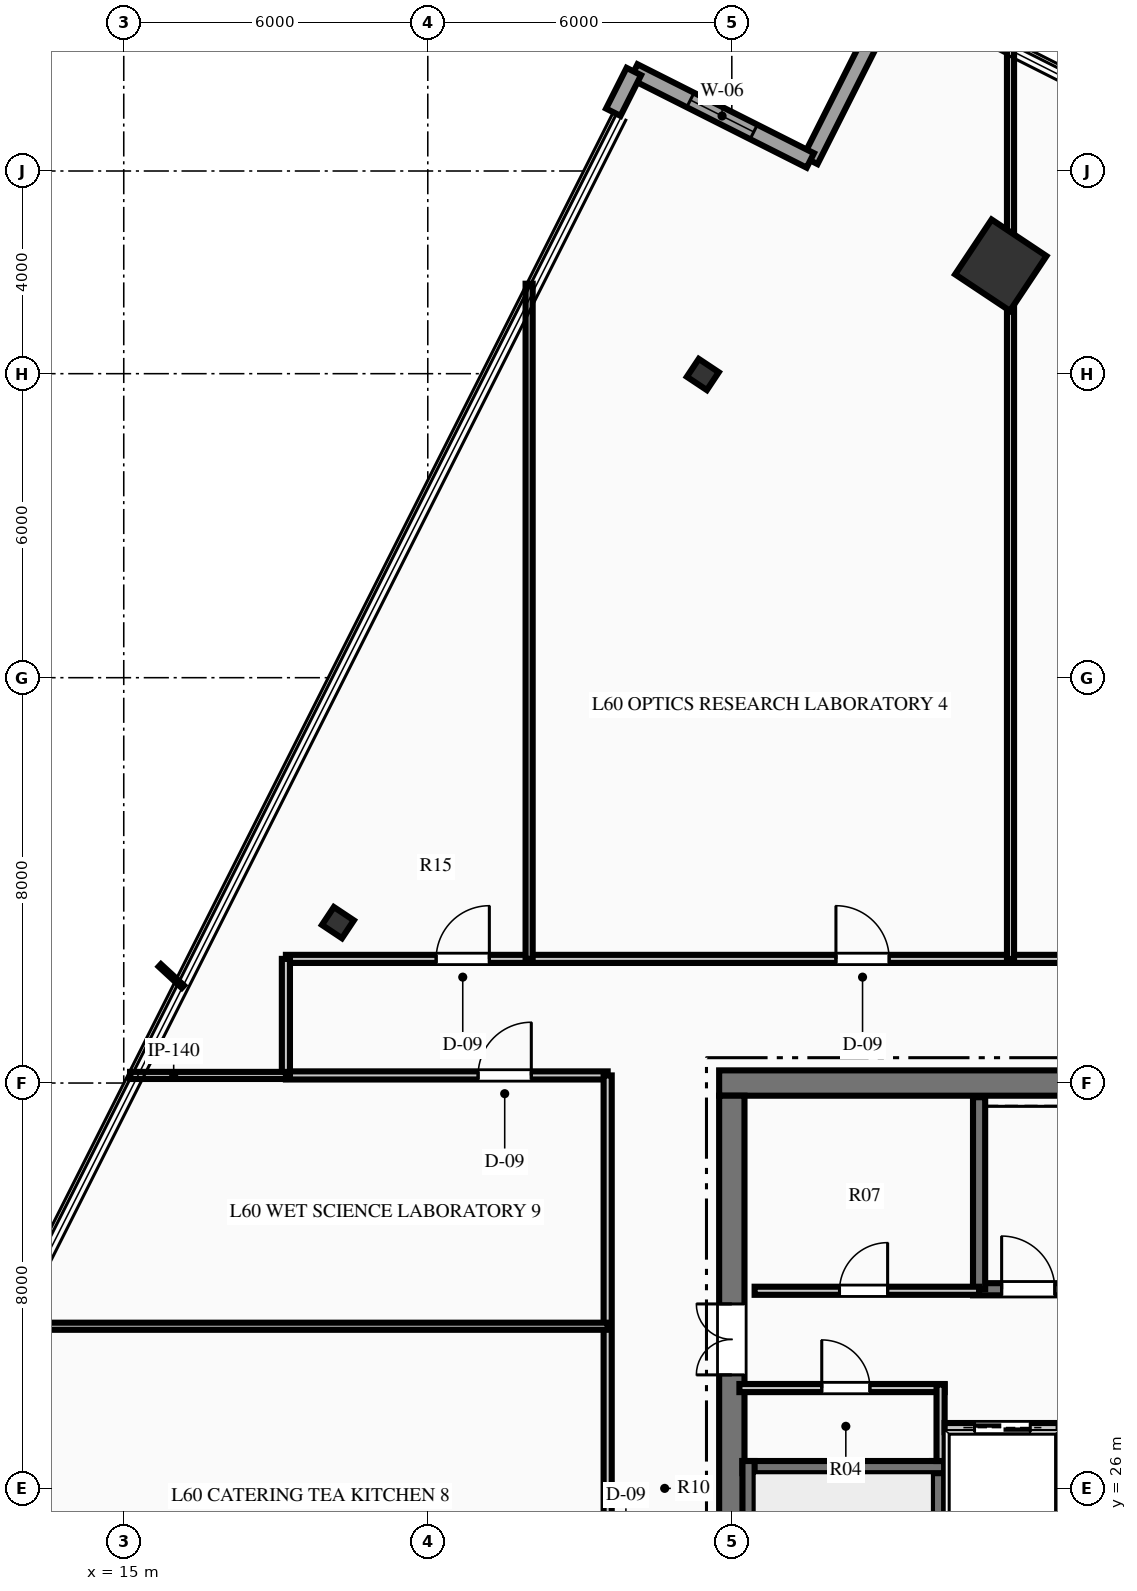
"""IFC4 building model, lengths in metres.
Left out: names, types, materials, properties, quantities, classifications, styles, units other than length and angle.
Written with IfcOpenShell. Run it as: python <this file> out.ifc"""

import sys

from ifc_helpers import new_model, si_unit, direction, frame, frame_2d, origin, origin_2d, place, context, subcontext, project, spatial, rectangle, hollow_rectangle, i_section, extrude, element, fill, save


model = new_model("IFC4")
c1 = context("Model", 3, precision=1e-05, world=origin(), true_north=direction((0.0, 1.0)))
c2 = subcontext(c1, "Body", "Model", "MODEL_VIEW")
j1 = project(units=[si_unit("LENGTHUNIT", "METRE"), si_unit("PLANEANGLEUNIT", "RADIAN")], contexts=[c1])
p1 = place(None, origin())
s1 = spatial("IfcSite", under=j1, at=p1, CompositionType="ELEMENT")
p2 = place(p1, origin())
s2 = spatial("IfcBuilding", under=s1, at=p2, CompositionType="ELEMENT")
p3 = place(p2, frame((0.0, 0.0, 239.7)))
s3 = spatial("IfcBuildingStorey", under=s2, at=p3, CompositionType="ELEMENT", Elevation=239.7)
p4 = place(p3, frame((26.75, 34.0, 0.0), z_axis=(0.0, 0.0, 1.0), x_axis=(1.0, 0.0, 0.0)))
e1 = element("IfcWall", 1, at=p4, inside=s3, PredefinedType="SHEAR", context=c2, shape_type="SweptSolid", body=[
    extrude(rectangle(XDim=18.5, YDim=0.5, at=frame_2d((9.25, 0.0))), origin(), (0.0, 0.0, 1.0), 4.5),
])
p5 = place(p4, frame((13.935, 0.0, 0.0)))
e2 = element("IfcOpeningElement", 2, at=p5, cuts=e1, PredefinedType="OPENING", context=c2, shape_type="SweptSolid", body=[
    extrude(rectangle(XDim=1.1, YDim=2.15, at=frame_2d((0.55, 1.075))), frame((0.0, 0.26, 0.0), z_axis=(0.0, -1.0, 0.0), x_axis=(1.0, 0.0, 0.0)), (0.0, 0.0, 1.0), 0.52),
])
p6 = place(p4, frame((16.185, 0.0, 0.0)))
e3 = element("IfcOpeningElement", 3, at=p6, cuts=e1, PredefinedType="OPENING", context=c2, shape_type="SweptSolid", body=[
    extrude(rectangle(XDim=1.1, YDim=2.15, at=frame_2d((0.55, 1.075))), frame((0.0, 0.26, 0.0), z_axis=(0.0, -1.0, 0.0), x_axis=(1.0, 0.0, 0.0)), (0.0, 0.0, 1.0), 0.52),
])
p7 = place(p3, frame((27.0, 18.25, 0.0), z_axis=(0.0, 0.0, 1.0), x_axis=(0.0, 1.0, 0.0)))
e4 = element("IfcWall", 4, at=p7, inside=s3, PredefinedType="SHEAR", context=c2, shape_type="SweptSolid", body=[
    extrude(rectangle(XDim=15.5, YDim=0.5, at=frame_2d((7.75, 0.0))), origin(), (0.0, 0.0, 1.0), 4.5),
])
p8 = place(p7, frame((9.99, 0.0, 0.0)))
e5 = element("IfcOpeningElement", 5, at=p8, cuts=e4, PredefinedType="OPENING", context=c2, shape_type="SweptSolid", body=[
    extrude(rectangle(XDim=1.4, YDim=2.2, at=frame_2d((0.7, 1.1))), frame((0.0, 0.26, 0.0), z_axis=(0.0, -1.0, 0.0), x_axis=(1.0, 0.0, 0.0)), (0.0, 0.0, 1.0), 0.52),
])
p9 = place(p3, frame((31.07, 18.28, 0.0), z_axis=(0.0, 0.0, 1.0), x_axis=(0.0, 1.0, 0.0)))
e6 = element("IfcWall", 6, at=p9, inside=s3, PredefinedType="SHEAR", context=c2, shape_type="SweptSolid", body=[
    extrude(rectangle(XDim=8.26, YDim=0.24, at=frame_2d((4.13, 0.0))), origin(), (0.0, 0.0, 1.0), 4.5),
])
p10 = place(p9, frame((0.365, 0.0, 0.0)))
e7 = element("IfcOpeningElement", 7, at=p10, cuts=e6, PredefinedType="OPENING", context=c2, shape_type="SweptSolid", body=[
    extrude(rectangle(XDim=1.05, YDim=2.15, at=frame_2d((0.525, 1.075))), frame((0.0, 0.13, 0.0), z_axis=(0.0, -1.0, 0.0), x_axis=(1.0, 0.0, 0.0)), (0.0, 0.0, 1.0), 0.26),
])
p11 = place(p3, frame((27.21, 26.42, 0.0), z_axis=(0.0, 0.0, 1.0), x_axis=(1.0, 0.0, 0.0)))
e8 = element("IfcWall", 8, at=p11, inside=s3, PredefinedType="SHEAR", context=c2, shape_type="SweptSolid", body=[
    extrude(rectangle(XDim=3.98, YDim=0.24, at=frame_2d((1.99, 0.0))), origin(), (0.0, 0.0, 1.0), 4.5),
])
p12 = place(p3, frame((27.33, 18.28, 0.0), z_axis=(0.0, 0.0, 1.0), x_axis=(0.0, 1.0, 0.0)))
e9 = element("IfcWall", 9, at=p12, inside=s3, PredefinedType="SHEAR", context=c2, shape_type="SweptSolid", body=[
    extrude(rectangle(XDim=8.26, YDim=0.24, at=frame_2d((4.13, 0.0))), origin(), (0.0, 0.0, 1.0), 4.5),
])
p13 = place(p3, frame((31.76, 29.93, 0.0), z_axis=(0.0, 0.0, 1.0), x_axis=(1.0, 0.0, 0.0)))
e10 = element("IfcWall", 10, at=p13, inside=s3, PredefinedType="SHEAR", context=c2, shape_type="SweptSolid", body=[
    extrude(rectangle(XDim=8.38, YDim=0.24, at=frame_2d((4.19, 0.0))), origin(), (0.0, 0.0, 1.0), 4.5),
])
p14 = place(p13, frame((0.565, 0.0, 0.0)))
e11 = element("IfcOpeningElement", 11, at=p14, cuts=e10, PredefinedType="OPENING", context=c2, shape_type="SweptSolid", body=[
    extrude(rectangle(XDim=1.05, YDim=2.15, at=frame_2d((0.525, 1.075))), frame((0.0, 0.13, 0.0), z_axis=(0.0, -1.0, 0.0), x_axis=(1.0, 0.0, 0.0)), (0.0, 0.0, 1.0), 0.26),
])
p15 = place(p3, frame((31.88, 29.93, 0.0), z_axis=(0.0, 0.0, 1.0), x_axis=(0.0, 1.0, 0.0)))
e12 = element("IfcWall", 12, at=p15, inside=s3, PredefinedType="SHEAR", context=c2, shape_type="SweptSolid", body=[
    extrude(rectangle(XDim=3.79, YDim=0.24, at=frame_2d((1.895, 0.0))), origin(), (0.0, 0.0, 1.0), 4.5),
])
p16 = place(p3, frame((32.308, 50.141, 0.0), z_axis=(0.0, 0.0, 1.0), x_axis=(0.554118199338, 0.832437998389, 0.0)))
e13 = element("IfcColumn", 13, at=p16, inside=s3, PredefinedType="COLUMN", context=c2, shape_type="SweptSolid", body=[
    extrude(hollow_rectangle(XDim=1.3, YDim=1.3, WallThickness=0.06, at=origin_2d()), origin(), (0.0, 0.0, 1.0), 4.5),
])
for number, where, z_axis, x_axis in (
    (14, (26.428, 47.984, 0.0), (0.0, 0.0, 1.0), (0.554, 0.832, 0.0)),
    (15, (19.226, 37.166, 0.0), (0.0, 0.0, 1.0), (0.554, 0.832, 0.0)),
):
    element("IfcColumn", number, at=place(p3, frame(where, z_axis=z_axis, x_axis=x_axis)), inside=s3, PredefinedType="COLUMN", context=c2, shape_type="SweptSolid", body=[
        extrude(i_section(OverallWidth=0.424, OverallDepth=0.474, WebThickness=0.048, FlangeThickness=0.077, at=origin_2d()), origin(), (0.0, 0.0, 1.0), 4.5),
    ])
p17 = place(p3, frame((28.549, 52.208, 0.0), z_axis=(0.0, 0.0, 1.0), x_axis=(0.450090857711, 0.892982765682, 0.0)))
e16 = element("IfcWall", 16, at=p17, inside=s3, PredefinedType="STANDARD", context=c2, shape_type="SweptSolid", body=[
    extrude(rectangle(XDim=3.9, YDim=0.32, at=frame_2d((1.95, 0.0))), origin(), (0.0, 0.0, 1.0), 4.1),
])
p18 = place(p3, frame((25.066, 53.964, 0.0), z_axis=(0.0, 0.0, 1.0), x_axis=(0.892982765682, -0.450090857711, 0.0)))
e17 = element("IfcWall", 17, at=p18, inside=s3, PredefinedType="STANDARD", context=c2, shape_type="SweptSolid", body=[
    extrude(rectangle(XDim=3.9, YDim=0.32, at=frame_2d((1.95, 0.0))), origin(), (0.0, 0.0, 1.0), 4.1),
])
p19 = place(p18, frame((1.25, 0.0, 0.85)))
e18 = element("IfcOpeningElement", 18, at=p19, cuts=e17, PredefinedType="OPENING", context=c2, shape_type="SweptSolid", body=[
    extrude(rectangle(XDim=1.4, YDim=2.0, at=frame_2d((0.7, 1.0))), frame((0.0, 0.17, 0.0), z_axis=(0.0, -1.0, 0.0), x_axis=(1.0, 0.0, 0.0)), (0.0, 0.0, 1.0), 0.34),
])
p20 = place(p3, frame((24.661, 53.16, 0.0), z_axis=(0.0, 0.0, 1.0), x_axis=(0.450032551421, 0.893012151464, 0.0)))
e19 = element("IfcWall", 19, at=p20, inside=s3, PredefinedType="STANDARD", context=c2, shape_type="SweptSolid", body=[
    extrude(rectangle(XDim=0.9, YDim=0.32, at=frame_2d((0.45, 0.0))), origin(), (0.0, 0.0, 1.0), 4.1),
])
p21 = place(p3, frame((27.15, 27.98, 0.0), z_axis=(0.0, 0.0, 1.0), x_axis=(1.0, 0.0, 0.0)))
e20 = element("IfcWall", 20, at=p21, inside=s3, PredefinedType="PARTITIONING", context=c2, shape_type="SweptSolid", body=[
    extrude(rectangle(XDim=4.05, YDim=0.16, at=frame_2d((2.025, 0.0))), origin(), (0.0, 0.0, 1.0), 4.1),
])
p22 = place(p21, frame((1.625, 0.0, 0.0)))
e21 = element("IfcOpeningElement", 21, at=p22, cuts=e20, PredefinedType="OPENING", context=c2, shape_type="SweptSolid", body=[
    extrude(rectangle(XDim=0.95, YDim=2.15, at=frame_2d((0.475, 1.075))), frame((0.0, 0.09, 0.0), z_axis=(0.0, -1.0, 0.0), x_axis=(1.0, 0.0, 0.0)), (0.0, 0.0, 1.0), 0.18),
])
p23 = place(p3, frame((31.12, 26.54, 0.0), z_axis=(0.0, 0.0, 1.0), x_axis=(0.0, 1.0, 0.0)))
e22 = element("IfcWall", 22, at=p23, inside=s3, PredefinedType="PARTITIONING", context=c2, shape_type="SweptSolid", body=[
    extrude(rectangle(XDim=1.51, YDim=0.16, at=frame_2d((0.755, 0.0))), origin(), (0.0, 0.0, 1.0), 4.1),
])
p24 = place(p3, frame((27.45, 29.9, 0.0), z_axis=(0.0, 0.0, 1.0), x_axis=(1.0, 0.0, 0.0)))
e23 = element("IfcWall", 23, at=p24, inside=s3, PredefinedType="PARTITIONING", context=c2, shape_type="SweptSolid", body=[
    extrude(rectangle(XDim=4.43, YDim=0.16, at=frame_2d((2.215, 0.0))), origin(), (0.0, 0.0, 1.0), 4.1),
])
p25 = place(p24, frame((1.675, 0.0, 0.0)))
e24 = element("IfcOpeningElement", 24, at=p25, cuts=e23, PredefinedType="OPENING", context=c2, shape_type="SweptSolid", body=[
    extrude(rectangle(XDim=0.95, YDim=2.15, at=frame_2d((0.475, 1.075))), frame((0.0, 0.09, 0.0), z_axis=(0.0, -1.0, 0.0), x_axis=(1.0, 0.0, 0.0)), (0.0, 0.0, 1.0), 0.18),
])
p26 = place(p3, frame((31.2, 27.2, 0.0), z_axis=(0.0, 0.0, 1.0), x_axis=(1.0, 0.0, 0.0)))
e25 = element("IfcWall", 25, at=p26, inside=s3, PredefinedType="PARTITIONING", context=c2, shape_type="SweptSolid", body=[
    extrude(rectangle(XDim=9.6, YDim=0.18, at=frame_2d((4.8, 0.0))), origin(), (0.0, 0.0, 1.0), 4.1),
])
p27 = place(p26, frame((0.59, 0.0, 0.0)))
e26 = element("IfcOpeningElement", 26, at=p27, cuts=e25, PredefinedType="OPENING", context=c2, shape_type="SweptSolid", body=[
    extrude(rectangle(XDim=1.1, YDim=2.15, at=frame_2d((0.55, 1.075))), frame((0.0, 0.1, 0.0), z_axis=(0.0, -1.0, 0.0), x_axis=(1.0, 0.0, 0.0)), (0.0, 0.0, 1.0), 0.2),
])
p28 = place(p26, frame((2.99, 0.0, 0.0)))
e27 = element("IfcOpeningElement", 27, at=p28, cuts=e25, PredefinedType="OPENING", context=c2, shape_type="SweptSolid", body=[
    extrude(rectangle(XDim=1.1, YDim=2.15, at=frame_2d((0.55, 1.075))), frame((0.0, 0.1, 0.0), z_axis=(0.0, -1.0, 0.0), x_axis=(1.0, 0.0, 0.0)), (0.0, 0.0, 1.0), 0.2),
])
p29 = place(p26, frame((5.51, 0.0, 0.0)))
e28 = element("IfcOpeningElement", 28, at=p29, cuts=e25, PredefinedType="OPENING", context=c2, shape_type="SweptSolid", body=[
    extrude(rectangle(XDim=1.1, YDim=2.15, at=frame_2d((0.55, 1.075))), frame((0.0, 0.1, 0.0), z_axis=(0.0, -1.0, 0.0), x_axis=(1.0, 0.0, 0.0)), (0.0, 0.0, 1.0), 0.2),
])
p30 = place(p26, frame((7.91, 0.0, 0.0)))
e29 = element("IfcOpeningElement", 29, at=p30, cuts=e25, PredefinedType="OPENING", context=c2, shape_type="SweptSolid", body=[
    extrude(rectangle(XDim=1.1, YDim=2.15, at=frame_2d((0.55, 1.075))), frame((0.0, 0.1, 0.0), z_axis=(0.0, -1.0, 0.0), x_axis=(1.0, 0.0, 0.0)), (0.0, 0.0, 1.0), 0.2),
])
p31 = place(p3, frame((18.2, 36.45, 0.0), z_axis=(0.0, 0.0, 1.0), x_axis=(1.0, 0.0, 0.0)))
e30 = element("IfcWall", 30, at=p31, inside=s3, PredefinedType="PARTITIONING", context=c2, shape_type="SweptSolid", body=[
    extrude(rectangle(XDim=35.6, YDim=0.16, at=frame_2d((17.8, 0.0))), origin(), (0.0, 0.0, 1.0), 2.595),
])
p32 = place(p31, frame((2.965, 0.0, 0.0)))
e31 = element("IfcOpeningElement", 31, at=p32, cuts=e30, PredefinedType="OPENING", context=c2, shape_type="SweptSolid", body=[
    extrude(rectangle(XDim=1.05, YDim=2.15, at=frame_2d((0.525, 1.075))), frame((0.0, 0.09, 0.0), z_axis=(0.0, -1.0, 0.0), x_axis=(1.0, 0.0, 0.0)), (0.0, 0.0, 1.0), 0.18),
])
p33 = place(p31, frame((10.855, 0.0, 0.0)))
e32 = element("IfcOpeningElement", 32, at=p33, cuts=e30, PredefinedType="OPENING", context=c2, shape_type="SweptSolid", body=[
    extrude(rectangle(XDim=1.05, YDim=2.15, at=frame_2d((0.525, 1.075))), frame((0.0, 0.09, 0.0), z_axis=(0.0, -1.0, 0.0), x_axis=(1.0, 0.0, 0.0)), (0.0, 0.0, 1.0), 0.18),
])
p34 = place(p31, frame((18.135, 0.0, 0.0)))
e33 = element("IfcOpeningElement", 33, at=p34, cuts=e30, PredefinedType="OPENING", context=c2, shape_type="SweptSolid", body=[
    extrude(rectangle(XDim=1.05, YDim=2.15, at=frame_2d((0.525, 1.075))), frame((0.0, 0.09, 0.0), z_axis=(0.0, -1.0, 0.0), x_axis=(1.0, 0.0, 0.0)), (0.0, 0.0, 1.0), 0.18),
])
p35 = place(p31, frame((32.175, 0.0, 0.0)))
e34 = element("IfcOpeningElement", 34, at=p35, cuts=e30, PredefinedType="OPENING", context=c2, shape_type="SweptSolid", body=[
    extrude(rectangle(XDim=1.05, YDim=2.15, at=frame_2d((0.525, 1.075))), frame((0.0, 0.09, 0.0), z_axis=(0.0, -1.0, 0.0), x_axis=(1.0, 0.0, 0.0)), (0.0, 0.0, 1.0), 0.18),
])
p36 = place(p3, frame((18.2, 34.15, 0.0), z_axis=(0.0, 0.0, 1.0), x_axis=(1.0, 0.0, 0.0)))
e35 = element("IfcWall", 35, at=p36, inside=s3, PredefinedType="PARTITIONING", context=c2, shape_type="SweptSolid", body=[
    extrude(rectangle(XDim=6.35, YDim=0.16, at=frame_2d((3.175, 0.0))), origin(), (0.0, 0.0, 1.0), 4.1),
])
p37 = place(p36, frame((3.793, 0.0, 0.0)))
e36 = element("IfcOpeningElement", 36, at=p37, cuts=e35, PredefinedType="OPENING", context=c2, shape_type="SweptSolid", body=[
    extrude(rectangle(XDim=1.05, YDim=2.15, at=frame_2d((0.525, 1.075))), frame((0.0, 0.09, 0.0), z_axis=(0.0, -1.0, 0.0), x_axis=(1.0, 0.0, 0.0)), (0.0, 0.0, 1.0), 0.18),
])
p38 = place(p3, frame((24.55, 17.85, 0.0), z_axis=(0.0, 0.0, 1.0), x_axis=(0.0, 1.0, 0.0)))
e37 = element("IfcWall", 37, at=p38, inside=s3, PredefinedType="PARTITIONING", context=c2, shape_type="SweptSolid", body=[
    extrude(rectangle(XDim=16.3, YDim=0.16, at=frame_2d((8.15, 0.0))), origin(), (0.0, 0.0, 1.0), 4.1),
])
p39 = place(p38, frame((6.149, 0.0, 0.0)))
e38 = element("IfcOpeningElement", 38, at=p39, cuts=e37, PredefinedType="OPENING", context=c2, shape_type="SweptSolid", body=[
    extrude(rectangle(XDim=1.05, YDim=2.15, at=frame_2d((0.525, 1.075))), frame((0.0, 0.09, 0.0), z_axis=(0.0, -1.0, 0.0), x_axis=(1.0, 0.0, 0.0)), (0.0, 0.0, 1.0), 0.18),
])
p40 = place(p3, frame((18.2, 34.15, 0.0), z_axis=(0.0, 0.0, 1.0), x_axis=(0.0, 1.0, 0.0)))
e39 = element("IfcWall", 39, at=p40, inside=s3, PredefinedType="PARTITIONING", context=c2, shape_type="SweptSolid", body=[
    extrude(rectangle(XDim=2.3, YDim=0.16, at=frame_2d((1.15, 0.0))), origin(), (0.0, 0.0, 1.0), 4.1),
])
p41 = place(p3, frame((15.124, 34.15, 0.0), z_axis=(0.0, 0.0, 1.0), x_axis=(1.0, 0.0, 0.0)))
e40 = element("IfcWall", 40, at=p41, inside=s3, PredefinedType="PARTITIONING", context=c2, shape_type="SweptSolid", body=[
    extrude(rectangle(XDim=3.076, YDim=0.14, at=frame_2d((1.538, 0.0))), origin(), (0.0, 0.0, 1.0), 4.1),
])
p42 = place(p3, frame((23.0, 36.45, 0.0), z_axis=(0.0, 0.0, 1.0), x_axis=(0.0, 1.0, 0.0)))
e41 = element("IfcWall", 41, at=p42, inside=s3, PredefinedType="PARTITIONING", context=c2, shape_type="SweptSolid", body=[
    extrude(rectangle(XDim=13.325, YDim=0.14, at=frame_2d((6.663, 0.0))), origin(), (0.0, 0.0, 1.0), 4.1),
])
p43 = place(p3, frame((32.5, 36.45, 0.0), z_axis=(0.0, 0.0, 1.0), x_axis=(0.0, 1.0, 0.0)))
e42 = element("IfcWall", 42, at=p43, inside=s3, PredefinedType="PARTITIONING", context=c2, shape_type="SweptSolid", body=[
    extrude(rectangle(XDim=18.09, YDim=0.14, at=frame_2d((9.045, 0.0))), origin(), (0.0, 0.0, 1.0), 2.595),
])
p44 = place(p3, frame((12.629, 29.2, 0.0), z_axis=(0.0, 0.0, 1.0), x_axis=(1.0, 0.0, 0.0)))
e43 = element("IfcWall", 43, at=p44, inside=s3, PredefinedType="PARTITIONING", context=c2, shape_type="SweptSolid", body=[
    extrude(rectangle(XDim=11.921, YDim=0.14, at=frame_2d((5.96, 0.0))), origin(), (0.0, 0.0, 1.0), 4.1),
])
p45 = place(p19, origin())
e44 = element("IfcWindow", 44, at=p45, inside=s3, PartitioningType="SINGLE_PANEL", PredefinedType="WINDOW", context=c2, shape_type="SweptSolid", body=[
    extrude(rectangle(XDim=1.4, YDim=2.0, at=frame_2d((0.7, 1.0))), frame((0.0, 0.03, 0.0), z_axis=(0.0, -1.0, 0.0), x_axis=(1.0, 0.0, 0.0)), (0.0, 0.0, 1.0), 0.06),
])
fill(e18, e44)
p46 = place(p22, origin())
e45 = element("IfcDoor", 45, at=p46, inside=s3, OperationType="SINGLE_SWING_LEFT", PredefinedType="DOOR", context=c2, shape_type="SweptSolid", body=[
    extrude(rectangle(XDim=0.95, YDim=2.15, at=frame_2d((0.475, 1.075))), frame((0.0, 0.025, 0.0), z_axis=(0.0, -1.0, 0.0), x_axis=(1.0, 0.0, 0.0)), (0.0, 0.0, 1.0), 0.05),
])
fill(e21, e45)
p47 = place(p25, origin())
e46 = element("IfcDoor", 46, at=p47, inside=s3, OperationType="SINGLE_SWING_RIGHT", PredefinedType="DOOR", context=c2, shape_type="SweptSolid", body=[
    extrude(rectangle(XDim=0.95, YDim=2.15, at=frame_2d((0.475, 1.075))), frame((0.0, 0.025, 0.0), z_axis=(0.0, -1.0, 0.0), x_axis=(1.0, 0.0, 0.0)), (0.0, 0.0, 1.0), 0.05),
])
fill(e24, e46)
p48 = place(p14, origin())
e47 = element("IfcDoor", 47, at=p48, inside=s3, OperationType="SINGLE_SWING_LEFT", PredefinedType="DOOR", context=c2, shape_type="SweptSolid", body=[
    extrude(rectangle(XDim=1.05, YDim=2.15, at=frame_2d((0.525, 1.075))), frame((0.0, 0.025, 0.0), z_axis=(0.0, -1.0, 0.0), x_axis=(1.0, 0.0, 0.0)), (0.0, 0.0, 1.0), 0.05),
])
fill(e11, e47)
p49 = place(p8, origin())
e48 = element("IfcDoor", 48, at=p49, inside=s3, OperationType="DOUBLE_DOOR_SINGLE_SWING", PredefinedType="DOOR", context=c2, shape_type="SweptSolid", body=[
    extrude(rectangle(XDim=1.4, YDim=2.2, at=frame_2d((0.7, 1.1))), frame((0.0, 0.025, 0.0), z_axis=(0.0, -1.0, 0.0), x_axis=(1.0, 0.0, 0.0)), (0.0, 0.0, 1.0), 0.05),
])
fill(e5, e48)
p50 = place(p32, origin())
e49 = element("IfcDoor", 49, at=p50, inside=s3, OperationType="SINGLE_SWING_RIGHT", PredefinedType="DOOR", context=c2, shape_type="SweptSolid", body=[
    extrude(rectangle(XDim=1.05, YDim=2.15, at=frame_2d((0.525, 1.075))), frame((0.0, 0.025, 0.0), z_axis=(0.0, -1.0, 0.0), x_axis=(1.0, 0.0, 0.0)), (0.0, 0.0, 1.0), 0.05),
])
fill(e31, e49)
p51 = place(p33, origin())
e50 = element("IfcDoor", 50, at=p51, inside=s3, OperationType="SINGLE_SWING_LEFT", PredefinedType="DOOR", context=c2, shape_type="SweptSolid", body=[
    extrude(rectangle(XDim=1.05, YDim=2.15, at=frame_2d((0.525, 1.075))), frame((0.0, 0.025, 0.0), z_axis=(0.0, -1.0, 0.0), x_axis=(1.0, 0.0, 0.0)), (0.0, 0.0, 1.0), 0.05),
])
fill(e32, e50)
p52 = place(p37, origin())
e51 = element("IfcDoor", 51, at=p52, inside=s3, OperationType="SINGLE_SWING_RIGHT", PredefinedType="DOOR", context=c2, shape_type="SweptSolid", body=[
    extrude(rectangle(XDim=1.05, YDim=2.15, at=frame_2d((0.525, 1.075))), frame((0.0, 0.025, 0.0), z_axis=(0.0, -1.0, 0.0), x_axis=(1.0, 0.0, 0.0)), (0.0, 0.0, 1.0), 0.05),
])
fill(e36, e51)
p53 = place(p27, origin())
e52 = element("IfcDoor", 52, at=p53, inside=s3, OperationType="SLIDING_TO_LEFT", PredefinedType="DOOR", context=c2, shape_type="SweptSolid", body=[
    extrude(rectangle(XDim=1.1, YDim=2.15, at=frame_2d((0.55, 1.075))), frame((0.0, 0.025, 0.0), z_axis=(0.0, -1.0, 0.0), x_axis=(1.0, 0.0, 0.0)), (0.0, 0.0, 1.0), 0.05),
])
fill(e26, e52)
save(model, sys.argv[1])
